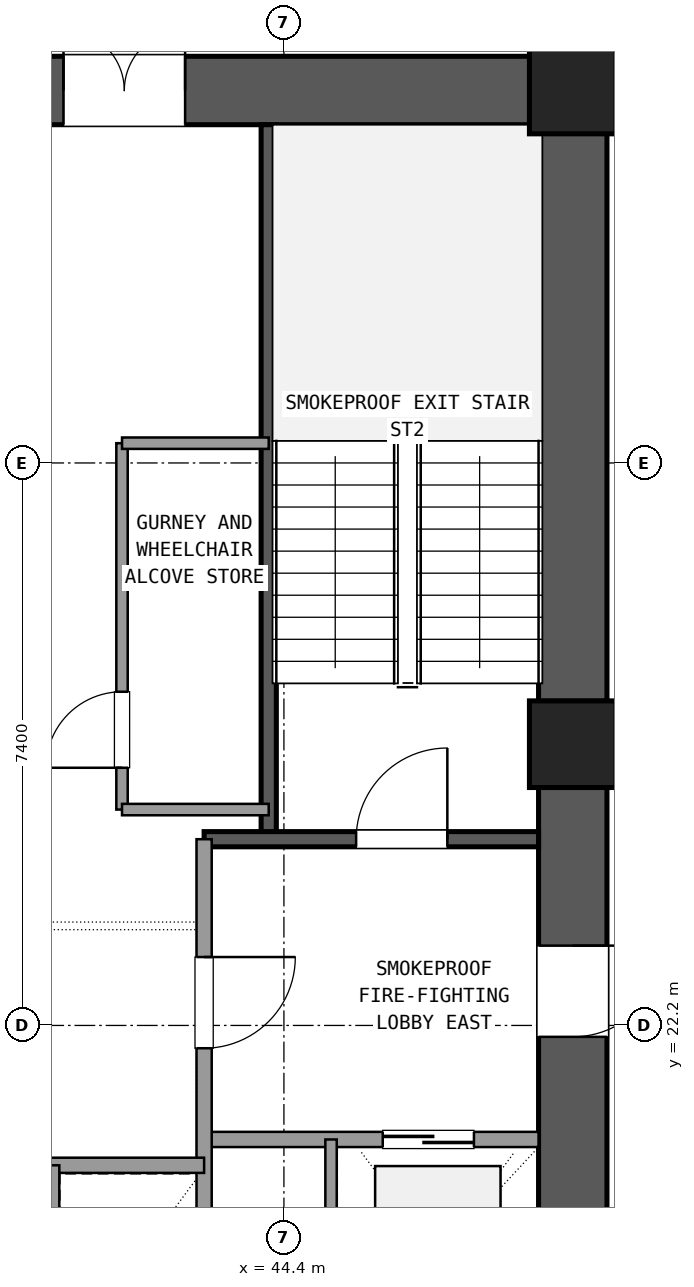
"""IFC4 building model, lengths in metres.
Left out: names, types, materials, properties, quantities, classifications, styles, units other than length and angle.
Written with IfcOpenShell. Run it as: python <this file> out.ifc"""

import sys

from ifc_helpers import new_model, si_unit, direction, frame, frame_2d, origin, origin_2d, place, context, subcontext, project, spatial, rectangle, extrude, element, fill, save


model = new_model("IFC4")
c1 = context("Model", 3, precision=1e-05, world=origin(), true_north=direction((0.0, 1.0)))
c2 = subcontext(c1, "Body", "Model", "MODEL_VIEW")
j1 = project(units=[si_unit("LENGTHUNIT", "METRE"), si_unit("PLANEANGLEUNIT", "RADIAN")], contexts=[c1])
p1 = place(None, origin())
s1 = spatial("IfcSite", under=j1, at=p1, CompositionType="ELEMENT")
p2 = place(p1, origin())
s2 = spatial("IfcBuilding", under=s1, at=p2, CompositionType="ELEMENT")
p3 = place(p2, frame((0.0, 0.0, 9.9)))
s3 = spatial("IfcBuildingStorey", under=s2, at=p3, CompositionType="ELEMENT", Elevation=9.9)
for number, where, z_axis, x_axis in (
    (1, (48.2, 25.9, 0.0), (0.0, 0.0, 1.0), (1.0, 0.0, 0.0)),
    (2, (48.2, 34.5, 0.0), (0.0, 0.0, 1.0), (1.0, 0.0, 0.0)),
):
    element("IfcColumn", number, at=place(p3, frame(where, z_axis=z_axis, x_axis=x_axis)), inside=s3, PredefinedType="COLUMN", context=c2, shape_type="SweptSolid", body=[
        extrude(rectangle(XDim=1.14, YDim=1.14, at=origin_2d()), origin(), (0.0, 0.0, 1.0), 4.5),
    ])
p4 = place(p3, frame((48.2, 17.865, 0.0), z_axis=(0.0, 0.0, 1.0), x_axis=(0.0, 1.0, 0.0)))
e3 = element("IfcWall", 3, at=p4, inside=s3, PredefinedType="SHEAR", context=c2, shape_type="SweptSolid", body=[
    extrude(rectangle(XDim=7.47, YDim=0.9, at=frame_2d((3.735, 0.0))), origin(), (0.0, 0.0, 1.0), 4.2),
])
p5 = place(p4, frame((4.185, 0.0, 0.0)))
e4 = element("IfcOpeningElement", 4, at=p5, cuts=e3, PredefinedType="OPENING", context=c2, shape_type="SweptSolid", body=[
    extrude(rectangle(XDim=1.2, YDim=2.15, at=frame_2d((0.6, 1.075))), frame((0.0, 0.46, 0.0), z_axis=(0.0, -1.0, 0.0), x_axis=(1.0, 0.0, 0.0)), (0.0, 0.0, 1.0), 0.92),
])
p6 = place(p3, frame((48.2, 26.465, 0.0), z_axis=(0.0, 0.0, 1.0), x_axis=(0.0, 1.0, 0.0)))
e5 = element("IfcWall", 5, at=p6, inside=s3, PredefinedType="SHEAR", context=c2, shape_type="SweptSolid", body=[
    extrude(rectangle(XDim=7.47, YDim=0.9, at=frame_2d((3.735, 0.0))), origin(), (0.0, 0.0, 1.0), 4.2),
])
p7 = place(p3, frame((47.635, 34.5, 0.0), z_axis=(0.0, 0.0, 1.0), x_axis=(-1.0, 0.0, 0.0)))
e6 = element("IfcWall", 6, at=p7, inside=s3, PredefinedType="SHEAR", context=c2, shape_type="SweptSolid", body=[
    extrude(rectangle(XDim=10.07, YDim=0.9, at=frame_2d((5.035, 0.0))), origin(), (0.0, 0.0, 1.0), 4.2),
])
p8 = place(p7, frame((4.535, 0.0, 0.0)))
e7 = element("IfcOpeningElement", 7, at=p8, cuts=e6, PredefinedType="OPENING", context=c2, shape_type="SweptSolid", body=[
    extrude(rectangle(XDim=1.6, YDim=2.2, at=frame_2d((0.8, 1.1))), frame((0.0, 0.46, 0.0), z_axis=(0.0, -1.0, 0.0), x_axis=(1.0, 0.0, 0.0)), (0.0, 0.0, 1.0), 0.92),
])
p9 = place(p3, frame((44.2, 24.65, 0.0), z_axis=(0.0, 0.0, 1.0), x_axis=(0.0, 1.0, 0.0)))
e8 = element("IfcWall", 8, at=p9, inside=s3, PredefinedType="SHEAR", context=c2, shape_type="SweptSolid", body=[
    extrude(rectangle(XDim=9.4, YDim=0.2, at=frame_2d((4.7, 0.0))), origin(), (0.0, 0.0, 1.0), 4.2),
])
p10 = place(p3, frame((43.35, 24.65, 0.0), z_axis=(0.0, 0.0, 1.0), x_axis=(1.0, 0.0, 0.0)))
e9 = element("IfcWall", 9, at=p10, inside=s3, PredefinedType="SHEAR", context=c2, shape_type="SweptSolid", body=[
    extrude(rectangle(XDim=4.4, YDim=0.2, at=frame_2d((2.2, 0.0))), origin(), (0.0, 0.0, 1.0), 4.2),
])
p11 = place(p10, frame((2.0, 0.0, 0.0)))
e10 = element("IfcOpeningElement", 10, at=p11, cuts=e9, PredefinedType="OPENING", context=c2, shape_type="SweptSolid", body=[
    extrude(rectangle(XDim=1.2, YDim=2.15, at=frame_2d((0.6, 1.075))), frame((0.0, 0.11, 0.0), z_axis=(0.0, -1.0, 0.0), x_axis=(1.0, 0.0, 0.0)), (0.0, 0.0, 1.0), 0.22),
])
p12 = place(p3, frame((43.35, 20.7, 0.0), z_axis=(0.0, 0.0, 1.0), x_axis=(1.0, 0.0, 0.0)))
e11 = element("IfcWall", 11, at=p12, inside=s3, PredefinedType="SOLIDWALL", context=c2, shape_type="SweptSolid", body=[
    extrude(rectangle(XDim=4.4, YDim=0.2, at=frame_2d((2.2, 0.0))), origin(), (0.0, 0.0, 1.0), 3.21),
])
p13 = place(p12, frame((2.35, 0.0, 0.0)))
e12 = element("IfcOpeningElement", 12, at=p13, cuts=e11, PredefinedType="OPENING", context=c2, shape_type="SweptSolid", body=[
    extrude(rectangle(XDim=1.2, YDim=2.15, at=frame_2d((0.6, 1.075))), frame((0.0, 0.11, 0.0), z_axis=(0.0, -1.0, 0.0), x_axis=(1.0, 0.0, 0.0)), (0.0, 0.0, 1.0), 0.22),
])
p14 = place(p3, frame((43.35, 17.75, 0.0), z_axis=(0.0, 0.0, 1.0), x_axis=(0.0, 1.0, 0.0)))
e13 = element("IfcWall", 13, at=p14, inside=s3, PredefinedType="SOLIDWALL", context=c2, shape_type="SweptSolid", body=[
    extrude(rectangle(XDim=6.9, YDim=0.2, at=frame_2d((3.45, 0.0))), origin(), (0.0, 0.0, 1.0), 3.21),
])
p15 = place(p14, frame((4.15, 0.0, 0.0)))
e14 = element("IfcOpeningElement", 14, at=p15, cuts=e13, PredefinedType="OPENING", context=c2, shape_type="SweptSolid", body=[
    extrude(rectangle(XDim=1.2, YDim=2.15, at=frame_2d((0.6, 1.075))), frame((0.0, 0.11, 0.0), z_axis=(0.0, -1.0, 0.0), x_axis=(1.0, 0.0, 0.0)), (0.0, 0.0, 1.0), 0.22),
])
p16 = place(p3, frame((45.02, 17.75, 0.0), z_axis=(0.0, 0.0, 1.0), x_axis=(0.0, 1.0, 0.0)))
e15 = element("IfcWall", 15, at=p16, inside=s3, PredefinedType="PARTITIONING", context=c2, shape_type="SweptSolid", body=[
    extrude(rectangle(XDim=2.95, YDim=0.15, at=frame_2d((1.475, 0.0))), origin(), (0.0, 0.0, 1.0), 3.21),
])
p17 = place(p3, frame((37.25, 20.36, 0.0), z_axis=(0.0, 0.0, 1.0), x_axis=(1.0, 0.0, 0.0)))
e16 = element("IfcWall", 16, at=p17, inside=s3, PredefinedType="SOLIDWALL", context=c2, shape_type="SweptSolid", body=[
    extrude(rectangle(XDim=6.1, YDim=0.2, at=frame_2d((3.05, 0.0))), origin(), (0.0, 0.0, 1.0), 3.21),
])
p18 = place(p3, frame((41.37, 17.75, 0.0), z_axis=(0.0, 0.0, 1.0), x_axis=(0.0, 1.0, 0.0)))
e17 = element("IfcWall", 17, at=p18, inside=s3, PredefinedType="PARTITIONING", context=c2, shape_type="SweptSolid", body=[
    extrude(rectangle(XDim=2.61, YDim=0.15, at=frame_2d((1.305, 0.0))), origin(), (0.0, 0.0, 1.0), 3.21),
])
p19 = place(p3, frame((42.27, 25.04, 0.0), z_axis=(0.0, 0.0, 1.0), x_axis=(0.0, 1.0, 0.0)))
e18 = element("IfcWall", 18, at=p19, inside=s3, PredefinedType="PARTITIONING", context=c2, shape_type="SweptSolid", body=[
    extrude(rectangle(XDim=4.82, YDim=0.15, at=frame_2d((2.41, 0.0))), origin(), (0.0, 0.0, 1.0), 3.21),
])
p20 = place(p19, frame((0.55, 0.0, 0.0)))
e19 = element("IfcOpeningElement", 19, at=p20, cuts=e18, PredefinedType="OPENING", context=c2, shape_type="SweptSolid", body=[
    extrude(rectangle(XDim=1.0, YDim=2.15, at=frame_2d((0.5, 1.075))), frame((0.0, 0.085, 0.0), z_axis=(0.0, -1.0, 0.0), x_axis=(1.0, 0.0, 0.0)), (0.0, 0.0, 1.0), 0.17),
])
for number, where, z_axis, x_axis in (
    (20, (42.27, 25.04, 0.0), (0.0, 0.0, 1.0), (1.0, 0.0, 0.0)),
    (21, (42.27, 29.86, 0.0), (0.0, 0.0, 1.0), (1.0, 0.0, 0.0)),
):
    element("IfcWall", number, at=place(p3, frame(where, z_axis=z_axis, x_axis=x_axis)), inside=s3, PredefinedType="PARTITIONING", context=c2, shape_type="SweptSolid", body=[
        extrude(rectangle(XDim=1.93, YDim=0.15, at=frame_2d((0.965, 0.0))), origin(), (0.0, 0.0, 1.0), 3.21),
    ])
p21 = place(p11, origin())
e22 = element("IfcDoor", 22, at=p21, inside=s3, OperationType="SINGLE_SWING_RIGHT", PredefinedType="DOOR", context=c2, shape_type="SweptSolid", body=[
    extrude(rectangle(XDim=1.2, YDim=2.15, at=frame_2d((0.6, 1.075))), frame((0.0, 0.025, 0.0), z_axis=(0.0, -1.0, 0.0), x_axis=(1.0, 0.0, 0.0)), (0.0, 0.0, 1.0), 0.05),
])
fill(e10, e22)
p22 = place(p13, origin())
e23 = element("IfcDoor", 23, at=p22, inside=s3, OperationType="SLIDING_TO_RIGHT", PredefinedType="DOOR", context=c2, shape_type="SweptSolid", body=[
    extrude(rectangle(XDim=1.2, YDim=2.15, at=frame_2d((0.6, 1.075))), frame((0.0, 0.025, 0.0), z_axis=(0.0, -1.0, 0.0), x_axis=(1.0, 0.0, 0.0)), (0.0, 0.0, 1.0), 0.05),
])
fill(e12, e23)
p23 = place(p15, frame((1.2, 0.0, 0.0), z_axis=(0.0, 0.0, 1.0), x_axis=(-1.0, 0.0, 0.0)))
e24 = element("IfcDoor", 24, at=p23, inside=s3, OperationType="SINGLE_SWING_RIGHT", PredefinedType="DOOR", context=c2, shape_type="SweptSolid", body=[
    extrude(rectangle(XDim=1.2, YDim=2.15, at=frame_2d((0.6, 1.075))), frame((0.0, 0.025, 0.0), z_axis=(0.0, -1.0, 0.0), x_axis=(1.0, 0.0, 0.0)), (0.0, 0.0, 1.0), 0.05),
])
fill(e14, e24)
p24 = place(p5, frame((1.2, 0.0, 0.0), z_axis=(0.0, 0.0, 1.0), x_axis=(-1.0, 0.0, 0.0)))
e25 = element("IfcDoor", 25, at=p24, inside=s3, OperationType="SINGLE_SWING_RIGHT", PredefinedType="DOOR", context=c2, shape_type="SweptSolid", body=[
    extrude(rectangle(XDim=1.2, YDim=2.15, at=frame_2d((0.6, 1.075))), frame((0.0, 0.025, 0.0), z_axis=(0.0, -1.0, 0.0), x_axis=(1.0, 0.0, 0.0)), (0.0, 0.0, 1.0), 0.05),
])
fill(e4, e25)
p25 = place(p8, frame((1.6, 0.0, 0.0), z_axis=(0.0, 0.0, 1.0), x_axis=(-1.0, 0.0, 0.0)))
e26 = element("IfcDoor", 26, at=p25, inside=s3, OperationType="DOUBLE_DOOR_SINGLE_SWING", PredefinedType="DOOR", context=c2, shape_type="SweptSolid", body=[
    extrude(rectangle(XDim=1.6, YDim=2.2, at=frame_2d((0.8, 1.1))), frame((0.0, 0.025, 0.0), z_axis=(0.0, -1.0, 0.0), x_axis=(1.0, 0.0, 0.0)), (0.0, 0.0, 1.0), 0.05),
])
fill(e7, e26)
p26 = place(p20, origin())
e27 = element("IfcDoor", 27, at=p26, inside=s3, OperationType="SINGLE_SWING_LEFT", PredefinedType="DOOR", context=c2, shape_type="SweptSolid", body=[
    extrude(rectangle(XDim=1.0, YDim=2.15, at=frame_2d((0.5, 1.075))), frame((0.0, 0.025, 0.0), z_axis=(0.0, -1.0, 0.0), x_axis=(1.0, 0.0, 0.0)), (0.0, 0.0, 1.0), 0.05),
])
fill(e19, e27)
save(model, sys.argv[1])
